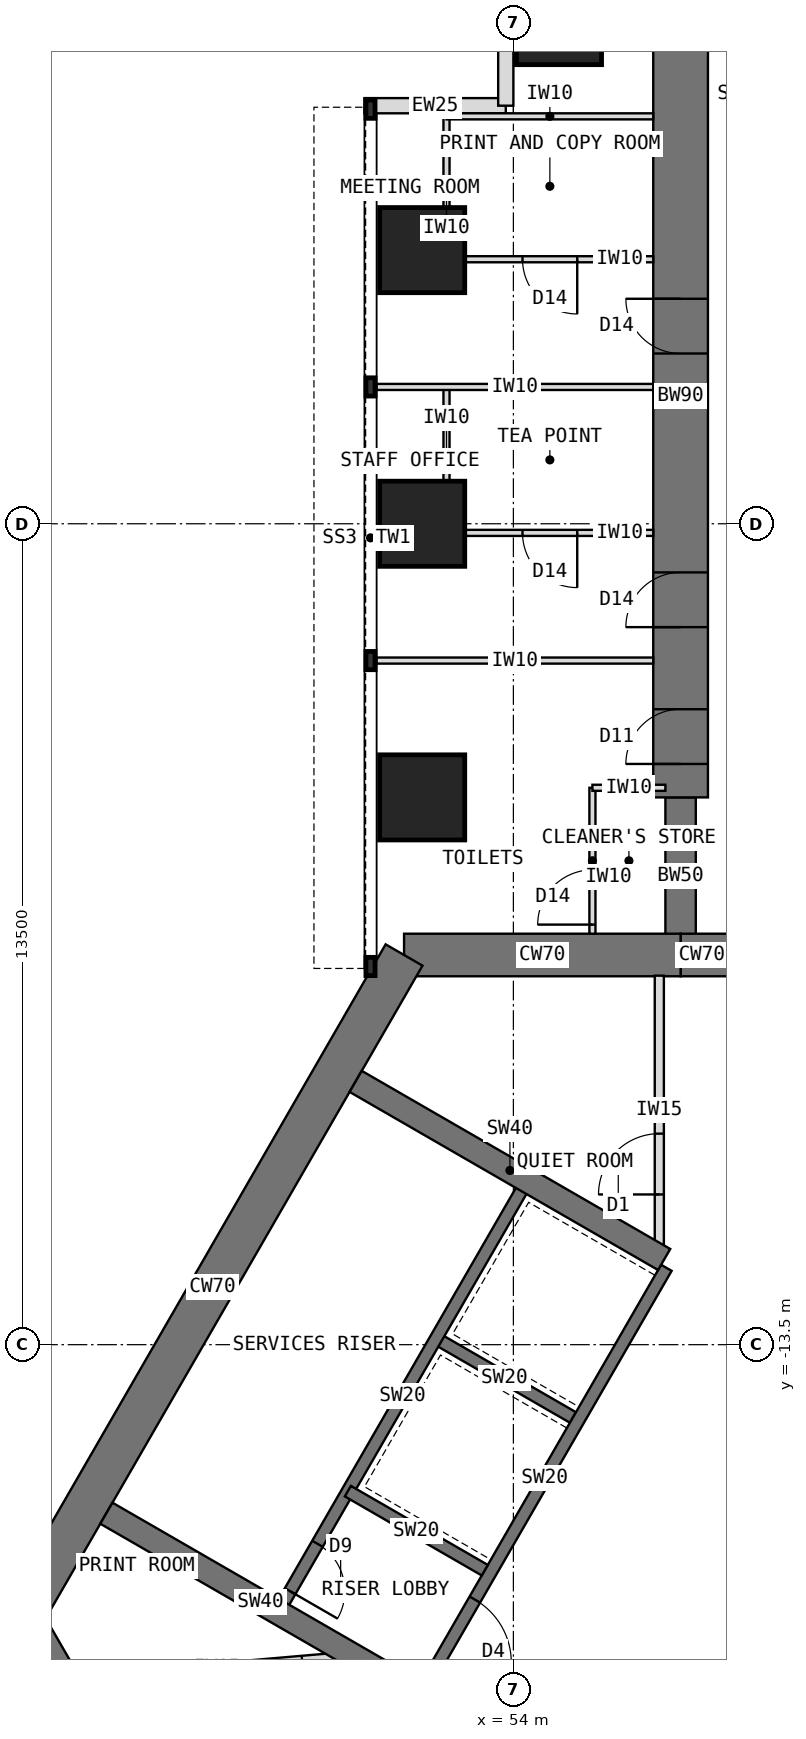
"""IFC4 building model, lengths in metres.
Left out: names, types, materials, properties, quantities, classifications, styles, units other than length and angle.
Written with IfcOpenShell. Run it as: python <this file> out.ifc"""

import sys

from ifc_helpers import new_model, si_unit, direction, frame, frame_2d, origin, origin_2d, place, context, subcontext, project, spatial, rectangle, extrude, element, fill, save


model = new_model("IFC4")
c1 = context("Model", 3, precision=1e-05, world=origin(), true_north=direction((0.0, 1.0)))
c2 = subcontext(c1, "Body", "Model", "MODEL_VIEW")
j1 = project(units=[si_unit("LENGTHUNIT", "METRE"), si_unit("PLANEANGLEUNIT", "RADIAN")], contexts=[c1])
p1 = place(None, origin())
s1 = spatial("IfcSite", under=j1, at=p1, CompositionType="ELEMENT")
p2 = place(p1, origin())
s2 = spatial("IfcBuilding", under=s1, at=p2, CompositionType="ELEMENT")
p3 = place(p2, frame((0.0, 0.0, 84.5)))
s3 = spatial("IfcBuildingStorey", under=s2, at=p3, CompositionType="ELEMENT", Elevation=84.5)
p4 = place(p3, frame((60.25, -7.092, 0.0), z_axis=(0.0, 0.0, 1.0), x_axis=(-1.0, 0.0, 0.0)))
e1 = element("IfcWall", 1, at=p4, inside=s3, PredefinedType="SHEAR", context=c2, shape_type="SweptSolid", body=[
    extrude(rectangle(XDim=3.5, YDim=0.7, at=frame_2d((1.75, 0.0))), origin(), (0.0, 0.0, 1.0), 4.0),
])
p5 = place(p4, frame((0.85, 0.0, 0.0)))
e2 = element("IfcOpeningElement", 2, at=p5, cuts=e1, PredefinedType="OPENING", context=c2, shape_type="SweptSolid", body=[
    extrude(rectangle(XDim=1.8, YDim=2.1, at=frame_2d((0.9, 1.05))), frame((0.0, 0.36, 0.0), z_axis=(0.0, -1.0, 0.0), x_axis=(1.0, 0.0, 0.0)), (0.0, 0.0, 1.0), 0.72),
])
p6 = place(p3, frame((56.75, -7.092, 0.0), z_axis=(0.0, 0.0, 1.0), x_axis=(-1.0, 0.0, 0.0)))
e3 = element("IfcWall", 3, at=p6, inside=s3, PredefinedType="SHEAR", context=c2, shape_type="SweptSolid", body=[
    extrude(rectangle(XDim=4.548, YDim=0.7, at=frame_2d((2.274, 0.0))), origin(), (0.0, 0.0, 1.0), 4.0),
])
p7 = place(p3, frame((52.202, -7.092, 0.0), z_axis=(0.0, 0.0, 1.0), x_axis=(-0.500005998175, -0.866021940709, 0.0)))
e4 = element("IfcWall", 4, at=p7, inside=s3, PredefinedType="SHEAR", context=c2, shape_type="SweptSolid", body=[
    extrude(rectangle(XDim=12.596, YDim=0.7, at=frame_2d((6.298, 0.0))), origin(), (0.0, 0.0, 1.0), 4.0),
])
p8 = place(p3, frame((45.904, -18.0, 0.0), z_axis=(0.0, 0.0, 1.0), x_axis=(0.500024481964, -0.866011268655, 0.0)))
e5 = element("IfcWall", 5, at=p8, inside=s3, PredefinedType="SHEAR", context=c2, shape_type="SweptSolid", body=[
    extrude(rectangle(XDim=4.548, YDim=0.7, at=frame_2d((2.274, 0.0))), origin(), (0.0, 0.0, 1.0), 4.0),
])
p9 = place(p3, frame((56.75, -7.092, 0.0), z_axis=(0.0, 0.0, 1.0), x_axis=(0.0, 1.0, 0.0)))
e6 = element("IfcWall", 6, at=p9, inside=s3, PredefinedType="SHEAR", context=c2, shape_type="SweptSolid", body=[
    extrude(rectangle(XDim=2.592, YDim=0.5, at=frame_2d((1.296, 0.0))), origin(), (0.0, 0.0, 1.0), 4.0),
])
p10 = place(p3, frame((56.75, -4.5, 0.0), z_axis=(0.0, 0.0, 1.0), x_axis=(0.0, 1.0, 0.0)))
e7 = element("IfcWall", 7, at=p10, inside=s3, PredefinedType="SHEAR", context=c2, shape_type="SweptSolid", body=[
    extrude(rectangle(XDim=13.2, YDim=0.9, at=frame_2d((6.6, 0.0))), origin(), (0.0, 0.0, 1.0), 4.0),
])
p11 = place(p10, frame((0.55, 0.0, 0.0)))
e8 = element("IfcOpeningElement", 8, at=p11, cuts=e7, PredefinedType="OPENING", context=c2, shape_type="SweptSolid", body=[
    extrude(rectangle(XDim=0.9, YDim=2.1, at=frame_2d((0.45, 1.05))), frame((0.0, 0.46, 0.0), z_axis=(0.0, -1.0, 0.0), x_axis=(1.0, 0.0, 0.0)), (0.0, 0.0, 1.0), 0.92),
])
p12 = place(p10, frame((2.8, 0.0, 0.0)))
e9 = element("IfcOpeningElement", 9, at=p12, cuts=e7, PredefinedType="OPENING", context=c2, shape_type="SweptSolid", body=[
    extrude(rectangle(XDim=0.9, YDim=2.1, at=frame_2d((0.45, 1.05))), frame((0.0, 0.46, 0.0), z_axis=(0.0, -1.0, 0.0), x_axis=(1.0, 0.0, 0.0)), (0.0, 0.0, 1.0), 0.92),
])
p13 = place(p10, frame((7.3, 0.0, 0.0)))
e10 = element("IfcOpeningElement", 10, at=p13, cuts=e7, PredefinedType="OPENING", context=c2, shape_type="SweptSolid", body=[
    extrude(rectangle(XDim=0.9, YDim=2.1, at=frame_2d((0.45, 1.05))), frame((0.0, 0.46, 0.0), z_axis=(0.0, -1.0, 0.0), x_axis=(1.0, 0.0, 0.0)), (0.0, 0.0, 1.0), 0.92),
])
for number, where, z_axis, x_axis in (
    (11, (52.5, -4.5, 0.0), (0.0, 0.0, 1.0), (1.0, 0.0, 0.0)),
    (12, (52.5, 0.0, 0.0), (0.0, 0.0, 1.0), (1.0, 0.0, 0.0)),
    (13, (52.5, 4.5, 0.0), (0.0, 0.0, 1.0), (1.0, 0.0, 0.0)),
    (14, (54.75, 8.25, 0.0), (0.0, 0.0, 1.0), (1.0, 0.0, 0.0)),
):
    element("IfcColumn", number, at=place(p3, frame(where, z_axis=z_axis, x_axis=x_axis)), inside=s3, PredefinedType="COLUMN", context=c2, shape_type="SweptSolid", body=[
        extrude(rectangle(XDim=1.4, YDim=1.4, at=origin_2d()), origin(), (0.0, 0.0, 1.0), 4.0),
    ])
for number, where, z_axis, x_axis in (
    (15, (51.55, 6.875, 0.0), (0.0, 0.0, 1.0), (1.0, 0.0, 0.0)),
    (16, (53.875, 6.875, 0.0), (0.0, 0.0, 1.0), (0.0, 1.0, 0.0)),
):
    element("IfcWall", number, at=place(p3, frame(where, z_axis=z_axis, x_axis=x_axis)), inside=s3, PredefinedType="STANDARD", context=c2, shape_type="SweptSolid", body=[
        extrude(rectangle(XDim=2.325, YDim=0.25, at=frame_2d((1.163, 0.0))), origin(), (0.0, 0.0, 1.0), 3.8),
    ])
p14 = place(p3, frame((56.516, -12.236, 0.0), z_axis=(0.0, 0.0, 1.0), x_axis=(-0.49999894854, -0.866026010844, 0.0)))
e17 = element("IfcWall", 17, at=p14, inside=s3, PredefinedType="SHEAR", context=c2, shape_type="SweptSolid", body=[
    extrude(rectangle(XDim=8.0, YDim=0.2, at=frame_2d((4.0, 0.0))), origin(), (0.0, 0.0, 1.0), 4.0),
])
p15 = place(p14, frame((6.3, 0.0, 0.0)))
e18 = element("IfcOpeningElement", 18, at=p15, cuts=e17, PredefinedType="OPENING", context=c2, shape_type="SweptSolid", body=[
    extrude(rectangle(XDim=1.2, YDim=2.1, at=frame_2d((0.6, 1.05))), frame((0.0, 0.11, 0.0), z_axis=(0.0, -1.0, 0.0), x_axis=(1.0, 0.0, 0.0)), (0.0, 0.0, 1.0), 0.22),
])
for number, where, z_axis, x_axis in (
    (19, (54.98, -14.697, 0.0), (0.0, 0.0, 1.0), (-0.866, 0.5, 0.0)),
    (20, (53.53, -17.209, 0.0), (0.0, 0.0, 1.0), (-0.866, 0.5, 0.0)),
):
    element("IfcWall", number, at=place(p3, frame(where, z_axis=z_axis, x_axis=x_axis)), inside=s3, PredefinedType="SHEAR", context=c2, shape_type="SweptSolid", body=[
        extrude(rectangle(XDim=2.6, YDim=0.2, at=frame_2d((1.3, 0.0))), origin(), (0.0, 0.0, 1.0), 4.0),
    ])
p16 = place(p3, frame((54.178, -10.886, 0.0), z_axis=(0.0, 0.0, 1.0), x_axis=(-0.49999894854, -0.866026010844, 0.0)))
e21 = element("IfcWall", 21, at=p16, inside=s3, PredefinedType="SHEAR", context=c2, shape_type="SweptSolid", body=[
    extrude(rectangle(XDim=8.0, YDim=0.2, at=frame_2d((4.0, 0.0))), origin(), (0.0, 0.0, 1.0), 4.0),
])
p17 = place(p16, frame((6.8, 0.0, 0.0)))
e22 = element("IfcOpeningElement", 22, at=p17, cuts=e21, PredefinedType="OPENING", context=c2, shape_type="SweptSolid", body=[
    extrude(rectangle(XDim=0.9, YDim=2.1, at=frame_2d((0.45, 1.05))), frame((0.0, 0.11, 0.0), z_axis=(0.0, -1.0, 0.0), x_axis=(1.0, 0.0, 0.0)), (0.0, 0.0, 1.0), 0.22),
])
for number, where, z_axis, x_axis in (
    (23, (52.38, -19.201, 0.0), (0.0, 0.0, 1.0), (-0.866, 0.5, 0.0)),
    (24, (56.48, -12.099, 0.0), (0.0, 0.0, 1.0), (-0.866, 0.5, 0.0)),
):
    element("IfcWall", number, at=place(p3, frame(where, z_axis=z_axis, x_axis=x_axis)), inside=s3, PredefinedType="SHEAR", context=c2, shape_type="SweptSolid", body=[
        extrude(rectangle(XDim=5.858, YDim=0.4, at=frame_2d((2.929, 0.0))), origin(), (0.0, 0.0, 1.0), 4.0),
    ])
for number, where, z_axis, x_axis in (
    (25, (56.3, -2.25, 0.0), (0.0, 0.0, 1.0), (-1.0, 0.0, 0.0)),
    (26, (56.3, 2.25, 0.0), (0.0, 0.0, 1.0), (-1.0, 0.0, 0.0)),
):
    element("IfcWall", number, at=place(p3, frame(where, z_axis=z_axis, x_axis=x_axis)), inside=s3, PredefinedType="PARTITIONING", context=c2, shape_type="SweptSolid", body=[
        extrude(rectangle(XDim=4.55, YDim=0.1, at=frame_2d((2.275, 0.0))), origin(), (0.0, 0.0, 1.0), 3.8),
    ])
p18 = place(p3, frame((52.9, -0.15, 0.0), z_axis=(0.0, 0.0, 1.0), x_axis=(0.0, 1.0, 0.0)))
e27 = element("IfcWall", 27, at=p18, inside=s3, PredefinedType="PARTITIONING", context=c2, shape_type="SweptSolid", body=[
    extrude(rectangle(XDim=2.4, YDim=0.1, at=frame_2d((1.2, 0.0))), origin(), (0.0, 0.0, 1.0), 3.8),
])
p19 = place(p3, frame((56.3, -0.15, 0.0), z_axis=(0.0, 0.0, 1.0), x_axis=(-1.0, 0.0, 0.0)))
e28 = element("IfcWall", 28, at=p19, inside=s3, PredefinedType="PARTITIONING", context=c2, shape_type="SweptSolid", body=[
    extrude(rectangle(XDim=3.4, YDim=0.1, at=frame_2d((1.7, 0.0))), origin(), (0.0, 0.0, 1.0), 3.8),
])
p20 = place(p19, frame((1.25, 0.0, 0.0)))
e29 = element("IfcOpeningElement", 29, at=p20, cuts=e28, PredefinedType="OPENING", context=c2, shape_type="SweptSolid", body=[
    extrude(rectangle(XDim=0.9, YDim=2.1, at=frame_2d((0.45, 1.05))), frame((0.0, 0.06, 0.0), z_axis=(0.0, -1.0, 0.0), x_axis=(1.0, 0.0, 0.0)), (0.0, 0.0, 1.0), 0.12),
])
p21 = place(p3, frame((52.9, 4.35, 0.0), z_axis=(0.0, 0.0, 1.0), x_axis=(0.0, 1.0, 0.0)))
e30 = element("IfcWall", 30, at=p21, inside=s3, PredefinedType="PARTITIONING", context=c2, shape_type="SweptSolid", body=[
    extrude(rectangle(XDim=2.4, YDim=0.1, at=frame_2d((1.2, 0.0))), origin(), (0.0, 0.0, 1.0), 3.8),
])
p22 = place(p3, frame((56.3, 4.35, 0.0), z_axis=(0.0, 0.0, 1.0), x_axis=(-1.0, 0.0, 0.0)))
e31 = element("IfcWall", 31, at=p22, inside=s3, PredefinedType="PARTITIONING", context=c2, shape_type="SweptSolid", body=[
    extrude(rectangle(XDim=3.4, YDim=0.1, at=frame_2d((1.7, 0.0))), origin(), (0.0, 0.0, 1.0), 3.8),
])
p23 = place(p22, frame((1.25, 0.0, 0.0)))
e32 = element("IfcOpeningElement", 32, at=p23, cuts=e31, PredefinedType="OPENING", context=c2, shape_type="SweptSolid", body=[
    extrude(rectangle(XDim=0.9, YDim=2.1, at=frame_2d((0.45, 1.05))), frame((0.0, 0.06, 0.0), z_axis=(0.0, -1.0, 0.0), x_axis=(1.0, 0.0, 0.0)), (0.0, 0.0, 1.0), 0.12),
])
p24 = place(p3, frame((56.3, 6.7, 0.0), z_axis=(0.0, 0.0, 1.0), x_axis=(-1.0, 0.0, 0.0)))
e33 = element("IfcWall", 33, at=p24, inside=s3, PredefinedType="PARTITIONING", context=c2, shape_type="SweptSolid", body=[
    extrude(rectangle(XDim=3.4, YDim=0.1, at=frame_2d((1.7, 0.0))), origin(), (0.0, 0.0, 1.0), 3.8),
])
p25 = place(p3, frame((55.3, -6.742, 0.0), z_axis=(0.0, 0.0, 1.0), x_axis=(0.0, 1.0, 0.0)))
e34 = element("IfcWall", 34, at=p25, inside=s3, PredefinedType="PARTITIONING", context=c2, shape_type="SweptSolid", body=[
    extrude(rectangle(XDim=2.4, YDim=0.1, at=frame_2d((1.2, 0.0))), origin(), (0.0, 0.0, 1.0), 3.8),
])
p26 = place(p25, frame((0.15, 0.0, 0.0)))
e35 = element("IfcOpeningElement", 35, at=p26, cuts=e34, PredefinedType="OPENING", context=c2, shape_type="SweptSolid", body=[
    extrude(rectangle(XDim=0.9, YDim=2.1, at=frame_2d((0.45, 1.05))), frame((0.0, 0.06, 0.0), z_axis=(0.0, -1.0, 0.0), x_axis=(1.0, 0.0, 0.0)), (0.0, 0.0, 1.0), 0.12),
])
p27 = place(p3, frame((56.5, -4.342, 0.0), z_axis=(0.0, 0.0, 1.0), x_axis=(-1.0, 0.0, 0.0)))
e36 = element("IfcWall", 36, at=p27, inside=s3, PredefinedType="PARTITIONING", context=c2, shape_type="SweptSolid", body=[
    extrude(rectangle(XDim=1.2, YDim=0.1, at=frame_2d((0.6, 0.0))), origin(), (0.0, 0.0, 1.0), 3.8),
])
p28 = place(p3, frame((56.4, -11.857, 0.0), z_axis=(0.0, 0.0, 1.0), x_axis=(0.0, 1.0, 0.0)))
e37 = element("IfcWall", 37, at=p28, inside=s3, PredefinedType="PARTITIONING", context=c2, shape_type="SweptSolid", body=[
    extrude(rectangle(XDim=4.426, YDim=0.15, at=frame_2d((2.213, 0.0))), origin(), (0.0, 0.0, 1.0), 3.8),
])
p29 = place(p28, frame((0.828, 0.0, 0.0)))
e38 = element("IfcOpeningElement", 38, at=p29, cuts=e37, PredefinedType="OPENING", context=c2, shape_type="SweptSolid", body=[
    extrude(rectangle(XDim=1.0, YDim=2.1, at=frame_2d((0.5, 1.05))), frame((0.0, 0.085, 0.0), z_axis=(0.0, -1.0, 0.0), x_axis=(1.0, 0.0, 0.0)), (0.0, 0.0, 1.0), 0.17),
])
p30 = place(p3, frame((51.371, -18.618, 0.0), z_axis=(0.0, 0.0, 1.0), x_axis=(-0.996259708579, -0.086409450071, 0.0)))
e39 = element("IfcWall", 39, at=p30, inside=s3, PredefinedType="PARTITIONING", context=c2, shape_type="SweptSolid", body=[
    extrude(rectangle(XDim=4.498, YDim=0.15, at=frame_2d((2.249, 0.0))), origin(), (0.0, 0.0, 1.0), 3.8),
])
p31 = place(p30, frame((0.849, 0.0, 0.0)))
e40 = element("IfcOpeningElement", 40, at=p31, cuts=e39, PredefinedType="OPENING", context=c2, shape_type="SweptSolid", body=[
    extrude(rectangle(XDim=1.0, YDim=2.1, at=frame_2d((0.5, 1.05))), frame((0.0, 0.085, 0.0), z_axis=(0.0, -1.0, 0.0), x_axis=(1.0, 0.0, 0.0)), (0.0, 0.0, 1.0), 0.17),
])
p32 = place(p15, origin())
e41 = element("IfcDoor", 41, at=p32, inside=s3, OperationType="SINGLE_SWING_RIGHT", PredefinedType="DOOR", context=c2, shape_type="SweptSolid", body=[
    extrude(rectangle(XDim=1.2, YDim=2.1, at=frame_2d((0.6, 1.05))), frame((0.0, 0.025, 0.0), z_axis=(0.0, -1.0, 0.0), x_axis=(1.0, 0.0, 0.0)), (0.0, 0.0, 1.0), 0.05),
])
fill(e18, e41)
p33 = place(p17, origin())
e42 = element("IfcDoor", 42, at=p33, inside=s3, OperationType="SINGLE_SWING_RIGHT", PredefinedType="DOOR", context=c2, shape_type="SweptSolid", body=[
    extrude(rectangle(XDim=0.9, YDim=2.1, at=frame_2d((0.45, 1.05))), frame((0.0, 0.025, 0.0), z_axis=(0.0, -1.0, 0.0), x_axis=(1.0, 0.0, 0.0)), (0.0, 0.0, 1.0), 0.05),
])
fill(e22, e42)
p34 = place(p20, origin())
e43 = element("IfcDoor", 43, at=p34, inside=s3, OperationType="SINGLE_SWING_LEFT", PredefinedType="DOOR", context=c2, shape_type="SweptSolid", body=[
    extrude(rectangle(XDim=0.9, YDim=2.1, at=frame_2d((0.45, 1.05))), frame((0.0, 0.025, 0.0), z_axis=(0.0, -1.0, 0.0), x_axis=(1.0, 0.0, 0.0)), (0.0, 0.0, 1.0), 0.05),
])
fill(e29, e43)
p35 = place(p23, origin())
e44 = element("IfcDoor", 44, at=p35, inside=s3, OperationType="SINGLE_SWING_LEFT", PredefinedType="DOOR", context=c2, shape_type="SweptSolid", body=[
    extrude(rectangle(XDim=0.9, YDim=2.1, at=frame_2d((0.45, 1.05))), frame((0.0, 0.025, 0.0), z_axis=(0.0, -1.0, 0.0), x_axis=(1.0, 0.0, 0.0)), (0.0, 0.0, 1.0), 0.05),
])
fill(e32, e44)
p36 = place(p26, origin())
e45 = element("IfcDoor", 45, at=p36, inside=s3, OperationType="SINGLE_SWING_LEFT", PredefinedType="DOOR", context=c2, shape_type="SweptSolid", body=[
    extrude(rectangle(XDim=0.9, YDim=2.1, at=frame_2d((0.45, 1.05))), frame((0.0, 0.025, 0.0), z_axis=(0.0, -1.0, 0.0), x_axis=(1.0, 0.0, 0.0)), (0.0, 0.0, 1.0), 0.05),
])
fill(e35, e45)
p37 = place(p31, origin())
e46 = element("IfcDoor", 46, at=p37, inside=s3, OperationType="SINGLE_SWING_LEFT", PredefinedType="DOOR", context=c2, shape_type="SweptSolid", body=[
    extrude(rectangle(XDim=1.0, YDim=2.1, at=frame_2d((0.5, 1.05))), frame((0.0, 0.025, 0.0), z_axis=(0.0, -1.0, 0.0), x_axis=(1.0, 0.0, 0.0)), (0.0, 0.0, 1.0), 0.05),
])
fill(e40, e46)
p38 = place(p29, origin())
e47 = element("IfcDoor", 47, at=p38, inside=s3, OperationType="SINGLE_SWING_LEFT", PredefinedType="DOOR", context=c2, shape_type="SweptSolid", body=[
    extrude(rectangle(XDim=1.0, YDim=2.1, at=frame_2d((0.5, 1.05))), frame((0.0, 0.025, 0.0), z_axis=(0.0, -1.0, 0.0), x_axis=(1.0, 0.0, 0.0)), (0.0, 0.0, 1.0), 0.05),
])
fill(e38, e47)
p39 = place(p11, origin())
e48 = element("IfcDoor", 48, at=p39, inside=s3, OperationType="SINGLE_SWING_LEFT", PredefinedType="DOOR", context=c2, shape_type="SweptSolid", body=[
    extrude(rectangle(XDim=0.82, YDim=2.06, at=frame_2d((0.45, 1.03))), frame((0.0, 0.025, 0.0), z_axis=(0.0, -1.0, 0.0), x_axis=(1.0, 0.0, 0.0)), (0.0, 0.0, 1.0), 0.05),
    extrude(rectangle(XDim=0.04, YDim=2.1, at=frame_2d((0.02, 1.05))), frame((0.0, 0.45, 0.0), z_axis=(0.0, -1.0, 0.0), x_axis=(1.0, 0.0, 0.0)), (0.0, 0.0, 1.0), 0.899),
    extrude(rectangle(XDim=0.04, YDim=2.1, at=frame_2d((0.88, 1.05))), frame((0.0, 0.45, 0.0), z_axis=(0.0, -1.0, 0.0), x_axis=(1.0, 0.0, 0.0)), (0.0, 0.0, 1.0), 0.899),
    extrude(rectangle(XDim=0.82, YDim=0.04, at=frame_2d((0.45, 2.08))), frame((0.0, 0.45, 0.0), z_axis=(0.0, -1.0, 0.0), x_axis=(1.0, 0.0, 0.0)), (0.0, 0.0, 1.0), 0.899),
])
fill(e8, e48)
p40 = place(p12, origin())
e49 = element("IfcDoor", 49, at=p40, inside=s3, OperationType="SINGLE_SWING_LEFT", PredefinedType="DOOR", context=c2, shape_type="SweptSolid", body=[
    extrude(rectangle(XDim=0.82, YDim=2.06, at=frame_2d((0.45, 1.03))), frame((0.0, 0.025, 0.0), z_axis=(0.0, -1.0, 0.0), x_axis=(1.0, 0.0, 0.0)), (0.0, 0.0, 1.0), 0.05),
    extrude(rectangle(XDim=0.04, YDim=2.1, at=frame_2d((0.02, 1.05))), frame((0.0, 0.45, 0.0), z_axis=(0.0, -1.0, 0.0), x_axis=(1.0, 0.0, 0.0)), (0.0, 0.0, 1.0), 0.899),
    extrude(rectangle(XDim=0.04, YDim=2.1, at=frame_2d((0.88, 1.05))), frame((0.0, 0.45, 0.0), z_axis=(0.0, -1.0, 0.0), x_axis=(1.0, 0.0, 0.0)), (0.0, 0.0, 1.0), 0.899),
    extrude(rectangle(XDim=0.82, YDim=0.04, at=frame_2d((0.45, 2.08))), frame((0.0, 0.45, 0.0), z_axis=(0.0, -1.0, 0.0), x_axis=(1.0, 0.0, 0.0)), (0.0, 0.0, 1.0), 0.899),
])
fill(e9, e49)
p41 = place(p13, origin())
e50 = element("IfcDoor", 50, at=p41, inside=s3, OperationType="SINGLE_SWING_RIGHT", PredefinedType="DOOR", context=c2, shape_type="SweptSolid", body=[
    extrude(rectangle(XDim=0.82, YDim=2.06, at=frame_2d((0.45, 1.03))), frame((0.0, 0.025, 0.0), z_axis=(0.0, -1.0, 0.0), x_axis=(1.0, 0.0, 0.0)), (0.0, 0.0, 1.0), 0.05),
    extrude(rectangle(XDim=0.04, YDim=2.1, at=frame_2d((0.02, 1.05))), frame((0.0, 0.45, 0.0), z_axis=(0.0, -1.0, 0.0), x_axis=(1.0, 0.0, 0.0)), (0.0, 0.0, 1.0), 0.899),
    extrude(rectangle(XDim=0.04, YDim=2.1, at=frame_2d((0.88, 1.05))), frame((0.0, 0.45, 0.0), z_axis=(0.0, -1.0, 0.0), x_axis=(1.0, 0.0, 0.0)), (0.0, 0.0, 1.0), 0.899),
    extrude(rectangle(XDim=0.82, YDim=0.04, at=frame_2d((0.45, 2.08))), frame((0.0, 0.45, 0.0), z_axis=(0.0, -1.0, 0.0), x_axis=(1.0, 0.0, 0.0)), (0.0, 0.0, 1.0), 0.899),
])
fill(e10, e50)
save(model, sys.argv[1])
